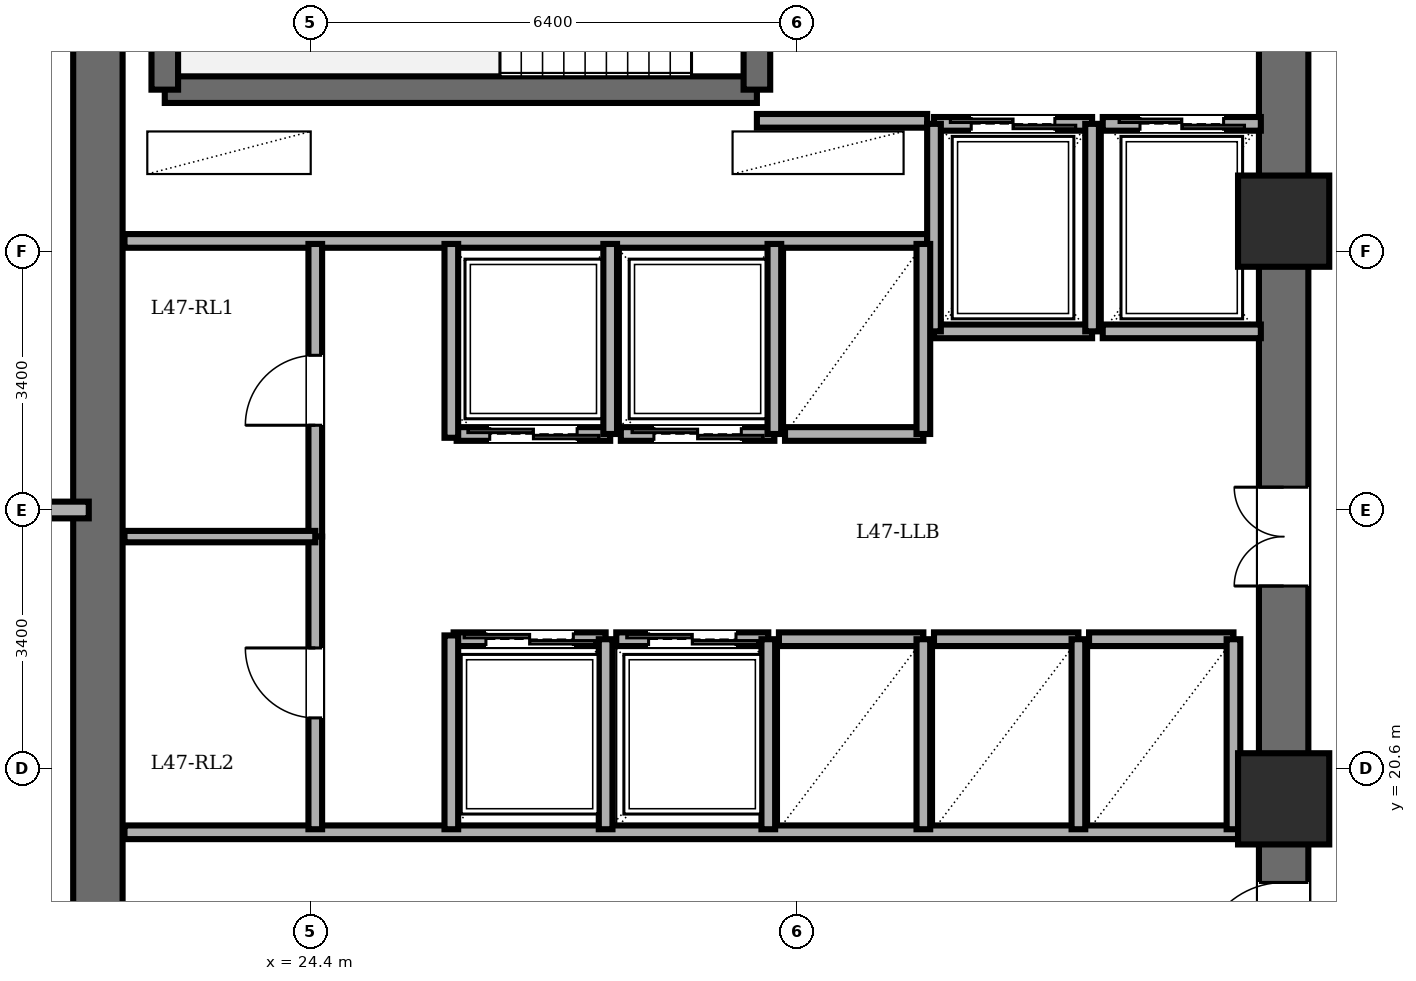
"""IFC4 building model, lengths in metres.
Left out: names, types, materials, properties, quantities, classifications, styles, units other than length and angle.
Written with IfcOpenShell. Run it as: python <this file> out.ifc"""

import sys

from ifc_helpers import new_model, si_unit, direction, frame, frame_2d, origin, origin_2d, place, context, subcontext, project, spatial, rectangle, extrude, element, fill, save


model = new_model("IFC4")
c1 = context("Model", 3, precision=1e-05, world=origin(), true_north=direction((0.0, 1.0)))
c2 = subcontext(c1, "Body", "Model", "MODEL_VIEW")
j1 = project(units=[si_unit("LENGTHUNIT", "METRE"), si_unit("PLANEANGLEUNIT", "RADIAN")], contexts=[c1])
p1 = place(None, origin())
s1 = spatial("IfcSite", under=j1, at=p1, CompositionType="ELEMENT")
p2 = place(p1, origin())
s2 = spatial("IfcBuilding", under=s1, at=p2, CompositionType="ELEMENT")
p3 = place(p2, frame((0.0, 0.0, 179.8)))
s3 = spatial("IfcBuildingStorey", under=s2, at=p3, CompositionType="ELEMENT", Elevation=179.8)
for number, where, z_axis, x_axis in (
    (1, (37.2, 20.2, 0.0), (0.0, 0.0, 1.0), (1.0, 0.0, 0.0)),
    (2, (37.2, 27.8, 0.0), (0.0, 0.0, 1.0), (1.0, 0.0, 0.0)),
):
    element("IfcColumn", number, at=place(p3, frame(where, z_axis=z_axis, x_axis=x_axis)), inside=s3, PredefinedType="COLUMN", context=c2, shape_type="SweptSolid", body=[
        extrude(rectangle(XDim=1.2, YDim=1.2, at=origin_2d()), origin(), (0.0, 0.0, 1.0), 3.6),
    ])
p4 = place(p3, frame((21.6, 14.4, 0.0), z_axis=(0.0, 0.0, 1.0), x_axis=(0.0, 1.0, 0.0)))
e3 = element("IfcWall", 3, at=p4, inside=s3, PredefinedType="SHEAR", context=c2, shape_type="SweptSolid", body=[
    extrude(rectangle(XDim=19.2, YDim=0.65, at=frame_2d((9.6, 0.0))), origin(), (0.0, 0.0, 1.0), 3.4),
])
p5 = place(p3, frame((37.2, 14.4, 0.0), z_axis=(0.0, 0.0, 1.0), x_axis=(0.0, 1.0, 0.0)))
e4 = element("IfcWall", 4, at=p5, inside=s3, PredefinedType="SHEAR", context=c2, shape_type="SweptSolid", body=[
    extrude(rectangle(XDim=19.2, YDim=0.65, at=frame_2d((9.6, 0.0))), origin(), (0.0, 0.0, 1.0), 3.4),
])
p6 = place(p5, frame((15.8, 0.0, 0.0)))
e5 = element("IfcOpeningElement", 5, at=p6, cuts=e4, PredefinedType="OPENING", context=c2, shape_type="SweptSolid", body=[
    extrude(rectangle(XDim=1.15, YDim=2.15, at=frame_2d((0.575, 1.075))), frame((0.0, 0.335, 0.0), z_axis=(0.0, -1.0, 0.0), x_axis=(1.0, 0.0, 0.0)), (0.0, 0.0, 1.0), 0.67),
])
p7 = place(p5, frame((3.6, 0.0, 0.0)))
e6 = element("IfcOpeningElement", 6, at=p7, cuts=e4, PredefinedType="OPENING", context=c2, shape_type="SweptSolid", body=[
    extrude(rectangle(XDim=1.1, YDim=2.15, at=frame_2d((0.55, 1.075))), frame((0.0, 0.335, 0.0), z_axis=(0.0, -1.0, 0.0), x_axis=(1.0, 0.0, 0.0)), (0.0, 0.0, 1.0), 0.67),
])
p8 = place(p5, frame((8.6, 0.0, 0.0)))
e7 = element("IfcOpeningElement", 7, at=p8, cuts=e4, PredefinedType="OPENING", context=c2, shape_type="SweptSolid", body=[
    extrude(rectangle(XDim=1.3, YDim=2.2, at=frame_2d((0.65, 1.1))), frame((0.0, 0.335, 0.0), z_axis=(0.0, -1.0, 0.0), x_axis=(1.0, 0.0, 0.0)), (0.0, 0.0, 1.0), 0.67),
])
p9 = place(p3, frame((22.48, 29.53, 0.0), z_axis=(0.0, 0.0, 1.0), x_axis=(1.0, 0.0, 0.0)))
e8 = element("IfcWall", 8, at=p9, inside=s3, PredefinedType="SOLIDWALL", context=c2, shape_type="SweptSolid", body=[
    extrude(rectangle(XDim=7.79, YDim=0.35, at=frame_2d((3.895, 0.0))), origin(), (0.0, 0.0, 1.0), 3.4),
])
p10 = place(p3, frame((22.48, 29.53, 0.0), z_axis=(0.0, 0.0, 1.0), x_axis=(0.0, 1.0, 0.0)))
e9 = element("IfcWall", 9, at=p10, inside=s3, PredefinedType="SOLIDWALL", context=c2, shape_type="SweptSolid", body=[
    extrude(rectangle(XDim=3.58, YDim=0.35, at=frame_2d((1.79, 0.0))), origin(), (0.0, 0.0, 1.0), 3.4),
])
p11 = place(p3, frame((30.27, 29.53, 0.0), z_axis=(0.0, 0.0, 1.0), x_axis=(0.0, 1.0, 0.0)))
e10 = element("IfcWall", 10, at=p11, inside=s3, PredefinedType="SOLIDWALL", context=c2, shape_type="SweptSolid", body=[
    extrude(rectangle(XDim=3.58, YDim=0.35, at=frame_2d((1.79, 0.0))), origin(), (0.0, 0.0, 1.0), 3.4),
])
p12 = place(p11, frame((1.25, 0.0, 0.0)))
e11 = element("IfcOpeningElement", 11, at=p12, cuts=e10, PredefinedType="OPENING", context=c2, shape_type="SweptSolid", body=[
    extrude(rectangle(XDim=1.1, YDim=2.15, at=frame_2d((0.55, 1.075))), frame((0.0, 0.185, 0.0), z_axis=(0.0, -1.0, 0.0), x_axis=(1.0, 0.0, 0.0)), (0.0, 0.0, 1.0), 0.37),
])
p13 = place(p3, frame((30.27, 29.12, 0.0), z_axis=(0.0, 0.0, 1.0), x_axis=(1.0, 0.0, 0.0)))
e12 = element("IfcWall", 12, at=p13, inside=s3, PredefinedType="PARTITIONING", context=c2, shape_type="SweptSolid", body=[
    extrude(rectangle(XDim=2.24, YDim=0.18, at=frame_2d((1.12, 0.0))), origin(), (0.0, 0.0, 1.0), 3.4),
])
p14 = place(p3, frame((21.95, 27.54, 0.0), z_axis=(0.0, 0.0, 1.0), x_axis=(1.0, 0.0, 0.0)))
e13 = element("IfcWall", 13, at=p14, inside=s3, PredefinedType="PARTITIONING", context=c2, shape_type="SweptSolid", body=[
    extrude(rectangle(XDim=10.56, YDim=0.18, at=frame_2d((5.28, 0.0))), origin(), (0.0, 0.0, 1.0), 3.4),
])
p15 = place(p3, frame((21.95, 19.76, 0.0), z_axis=(0.0, 0.0, 1.0), x_axis=(1.0, 0.0, 0.0)))
e14 = element("IfcWall", 14, at=p15, inside=s3, PredefinedType="PARTITIONING", context=c2, shape_type="SweptSolid", body=[
    extrude(rectangle(XDim=14.87, YDim=0.18, at=frame_2d((7.435, 0.0))), origin(), (0.0, 0.0, 1.0), 3.4),
])
p16 = place(p3, frame((32.6, 29.08, 0.0), z_axis=(0.0, 0.0, 1.0), x_axis=(1.0, 0.0, 0.0)))
e15 = element("IfcWall", 15, at=p16, inside=s3, PredefinedType="PARTITIONING", context=c2, shape_type="SweptSolid", body=[
    extrude(rectangle(XDim=2.08, YDim=0.18, at=frame_2d((1.04, 0.0))), origin(), (0.0, 0.0, 1.0), 3.4),
])
p17 = place(p16, frame((0.49, 0.0, 0.0)))
e16 = element("IfcOpeningElement", 16, at=p17, cuts=e15, PredefinedType="OPENING", context=c2, shape_type="SweptSolid", body=[
    extrude(rectangle(XDim=1.1, YDim=2.2, at=frame_2d((0.55, 1.1))), frame((0.0, 0.1, 0.0), z_axis=(0.0, -1.0, 0.0), x_axis=(1.0, 0.0, 0.0)), (0.0, 0.0, 1.0), 0.2),
])
p18 = place(p3, frame((34.68, 26.35, 0.0), z_axis=(0.0, 0.0, 1.0), x_axis=(-1.0, 0.0, 0.0)))
e17 = element("IfcWall", 17, at=p18, inside=s3, PredefinedType="PARTITIONING", context=c2, shape_type="SweptSolid", body=[
    extrude(rectangle(XDim=2.08, YDim=0.18, at=frame_2d((1.04, 0.0))), origin(), (0.0, 0.0, 1.0), 3.4),
])
for number, where, z_axis, x_axis in (
    (18, (34.68, 26.35, 0.0), (0.0, 0.0, 1.0), (0.0, 1.0, 0.0)),
    (19, (32.6, 29.08, 0.0), (0.0, 0.0, 1.0), (0.0, -1.0, 0.0)),
):
    element("IfcWall", number, at=place(p3, frame(where, z_axis=z_axis, x_axis=x_axis)), inside=s3, PredefinedType="PARTITIONING", context=c2, shape_type="SweptSolid", body=[
        extrude(rectangle(XDim=2.73, YDim=0.18, at=frame_2d((1.365, 0.0))), origin(), (0.0, 0.0, 1.0), 3.4),
    ])
p19 = place(p3, frame((34.82, 29.08, 0.0), z_axis=(0.0, 0.0, 1.0), x_axis=(1.0, 0.0, 0.0)))
e20 = element("IfcWall", 20, at=p19, inside=s3, PredefinedType="PARTITIONING", context=c2, shape_type="SweptSolid", body=[
    extrude(rectangle(XDim=2.08, YDim=0.18, at=frame_2d((1.04, 0.0))), origin(), (0.0, 0.0, 1.0), 3.4),
])
p20 = place(p19, frame((0.49, 0.0, 0.0)))
e21 = element("IfcOpeningElement", 21, at=p20, cuts=e20, PredefinedType="OPENING", context=c2, shape_type="SweptSolid", body=[
    extrude(rectangle(XDim=1.1, YDim=2.2, at=frame_2d((0.55, 1.1))), frame((0.0, 0.1, 0.0), z_axis=(0.0, -1.0, 0.0), x_axis=(1.0, 0.0, 0.0)), (0.0, 0.0, 1.0), 0.2),
])
p21 = place(p3, frame((36.9, 26.35, 0.0), z_axis=(0.0, 0.0, 1.0), x_axis=(-1.0, 0.0, 0.0)))
e22 = element("IfcWall", 22, at=p21, inside=s3, PredefinedType="PARTITIONING", context=c2, shape_type="SweptSolid", body=[
    extrude(rectangle(XDim=2.08, YDim=0.18, at=frame_2d((1.04, 0.0))), origin(), (0.0, 0.0, 1.0), 3.4),
])
p22 = place(p3, frame((28.34, 25.0, 0.0), z_axis=(0.0, 0.0, 1.0), x_axis=(-1.0, 0.0, 0.0)))
e23 = element("IfcWall", 23, at=p22, inside=s3, PredefinedType="PARTITIONING", context=c2, shape_type="SweptSolid", body=[
    extrude(rectangle(XDim=2.02, YDim=0.18, at=frame_2d((1.01, 0.0))), origin(), (0.0, 0.0, 1.0), 3.4),
])
p23 = place(p22, frame((0.435, 0.0, 0.0)))
e24 = element("IfcOpeningElement", 24, at=p23, cuts=e23, PredefinedType="OPENING", context=c2, shape_type="SweptSolid", body=[
    extrude(rectangle(XDim=1.15, YDim=2.2, at=frame_2d((0.575, 1.1))), frame((0.0, 0.1, 0.0), z_axis=(0.0, -1.0, 0.0), x_axis=(1.0, 0.0, 0.0)), (0.0, 0.0, 1.0), 0.2),
])
p24 = place(p3, frame((28.34, 25.0, 0.0), z_axis=(0.0, 0.0, 1.0), x_axis=(0.0, 1.0, 0.0)))
e25 = element("IfcWall", 25, at=p24, inside=s3, PredefinedType="PARTITIONING", context=c2, shape_type="SweptSolid", body=[
    extrude(rectangle(XDim=2.5, YDim=0.18, at=frame_2d((1.25, 0.0))), origin(), (0.0, 0.0, 1.0), 3.4),
])
p25 = place(p3, frame((30.5, 25.0, 0.0), z_axis=(0.0, 0.0, 1.0), x_axis=(-1.0, 0.0, 0.0)))
e26 = element("IfcWall", 26, at=p25, inside=s3, PredefinedType="PARTITIONING", context=c2, shape_type="SweptSolid", body=[
    extrude(rectangle(XDim=2.02, YDim=0.18, at=frame_2d((1.01, 0.0))), origin(), (0.0, 0.0, 1.0), 3.4),
])
p26 = place(p25, frame((0.435, 0.0, 0.0)))
e27 = element("IfcOpeningElement", 27, at=p26, cuts=e26, PredefinedType="OPENING", context=c2, shape_type="SweptSolid", body=[
    extrude(rectangle(XDim=1.15, YDim=2.2, at=frame_2d((0.575, 1.1))), frame((0.0, 0.1, 0.0), z_axis=(0.0, -1.0, 0.0), x_axis=(1.0, 0.0, 0.0)), (0.0, 0.0, 1.0), 0.2),
])
p27 = place(p3, frame((30.5, 25.0, 0.0), z_axis=(0.0, 0.0, 1.0), x_axis=(0.0, 1.0, 0.0)))
e28 = element("IfcWall", 28, at=p27, inside=s3, PredefinedType="PARTITIONING", context=c2, shape_type="SweptSolid", body=[
    extrude(rectangle(XDim=2.5, YDim=0.18, at=frame_2d((1.25, 0.0))), origin(), (0.0, 0.0, 1.0), 3.4),
])
p28 = place(p3, frame((26.28, 22.3, 0.0), z_axis=(0.0, 0.0, 1.0), x_axis=(1.0, 0.0, 0.0)))
e29 = element("IfcWall", 29, at=p28, inside=s3, PredefinedType="PARTITIONING", context=c2, shape_type="SweptSolid", body=[
    extrude(rectangle(XDim=2.0, YDim=0.18, at=frame_2d((1.0, 0.0))), origin(), (0.0, 0.0, 1.0), 3.4),
])
p29 = place(p28, frame((0.425, 0.0, 0.0)))
e30 = element("IfcOpeningElement", 30, at=p29, cuts=e29, PredefinedType="OPENING", context=c2, shape_type="SweptSolid", body=[
    extrude(rectangle(XDim=1.15, YDim=2.2, at=frame_2d((0.575, 1.1))), frame((0.0, 0.1, 0.0), z_axis=(0.0, -1.0, 0.0), x_axis=(1.0, 0.0, 0.0)), (0.0, 0.0, 1.0), 0.2),
])
p30 = place(p3, frame((28.28, 19.8, 0.0), z_axis=(0.0, 0.0, 1.0), x_axis=(0.0, 1.0, 0.0)))
e31 = element("IfcWall", 31, at=p30, inside=s3, PredefinedType="PARTITIONING", context=c2, shape_type="SweptSolid", body=[
    extrude(rectangle(XDim=2.5, YDim=0.18, at=frame_2d((1.25, 0.0))), origin(), (0.0, 0.0, 1.0), 3.4),
])
p31 = place(p3, frame((28.42, 22.3, 0.0), z_axis=(0.0, 0.0, 1.0), x_axis=(1.0, 0.0, 0.0)))
e32 = element("IfcWall", 32, at=p31, inside=s3, PredefinedType="PARTITIONING", context=c2, shape_type="SweptSolid", body=[
    extrude(rectangle(XDim=2.0, YDim=0.18, at=frame_2d((1.0, 0.0))), origin(), (0.0, 0.0, 1.0), 3.4),
])
p32 = place(p31, frame((0.425, 0.0, 0.0)))
e33 = element("IfcOpeningElement", 33, at=p32, cuts=e32, PredefinedType="OPENING", context=c2, shape_type="SweptSolid", body=[
    extrude(rectangle(XDim=1.15, YDim=2.2, at=frame_2d((0.575, 1.1))), frame((0.0, 0.1, 0.0), z_axis=(0.0, -1.0, 0.0), x_axis=(1.0, 0.0, 0.0)), (0.0, 0.0, 1.0), 0.2),
])
p33 = place(p3, frame((30.42, 19.8, 0.0), z_axis=(0.0, 0.0, 1.0), x_axis=(0.0, 1.0, 0.0)))
e34 = element("IfcWall", 34, at=p33, inside=s3, PredefinedType="PARTITIONING", context=c2, shape_type="SweptSolid", body=[
    extrude(rectangle(XDim=2.5, YDim=0.18, at=frame_2d((1.25, 0.0))), origin(), (0.0, 0.0, 1.0), 3.4),
])
p34 = place(p3, frame((32.46, 25.0, 0.0), z_axis=(0.0, 0.0, 1.0), x_axis=(-1.0, 0.0, 0.0)))
e35 = element("IfcWall", 35, at=p34, inside=s3, PredefinedType="PARTITIONING", context=c2, shape_type="SweptSolid", body=[
    extrude(rectangle(XDim=1.82, YDim=0.18, at=frame_2d((0.91, 0.0))), origin(), (0.0, 0.0, 1.0), 3.4),
])
p35 = place(p3, frame((32.46, 25.0, 0.0), z_axis=(0.0, 0.0, 1.0), x_axis=(0.0, 1.0, 0.0)))
e36 = element("IfcWall", 36, at=p35, inside=s3, PredefinedType="PARTITIONING", context=c2, shape_type="SweptSolid", body=[
    extrude(rectangle(XDim=2.5, YDim=0.18, at=frame_2d((1.25, 0.0))), origin(), (0.0, 0.0, 1.0), 3.4),
])
p36 = place(p3, frame((30.56, 22.3, 0.0), z_axis=(0.0, 0.0, 1.0), x_axis=(1.0, 0.0, 0.0)))
e37 = element("IfcWall", 37, at=p36, inside=s3, PredefinedType="PARTITIONING", context=c2, shape_type="SweptSolid", body=[
    extrude(rectangle(XDim=1.9, YDim=0.18, at=frame_2d((0.95, 0.0))), origin(), (0.0, 0.0, 1.0), 3.4),
])
p37 = place(p3, frame((32.46, 19.8, 0.0), z_axis=(0.0, 0.0, 1.0), x_axis=(0.0, 1.0, 0.0)))
e38 = element("IfcWall", 38, at=p37, inside=s3, PredefinedType="PARTITIONING", context=c2, shape_type="SweptSolid", body=[
    extrude(rectangle(XDim=2.5, YDim=0.18, at=frame_2d((1.25, 0.0))), origin(), (0.0, 0.0, 1.0), 3.4),
])
p38 = place(p3, frame((32.6, 22.3, 0.0), z_axis=(0.0, 0.0, 1.0), x_axis=(1.0, 0.0, 0.0)))
e39 = element("IfcWall", 39, at=p38, inside=s3, PredefinedType="PARTITIONING", context=c2, shape_type="SweptSolid", body=[
    extrude(rectangle(XDim=1.9, YDim=0.18, at=frame_2d((0.95, 0.0))), origin(), (0.0, 0.0, 1.0), 3.4),
])
p39 = place(p3, frame((34.5, 19.8, 0.0), z_axis=(0.0, 0.0, 1.0), x_axis=(0.0, 1.0, 0.0)))
e40 = element("IfcWall", 40, at=p39, inside=s3, PredefinedType="PARTITIONING", context=c2, shape_type="SweptSolid", body=[
    extrude(rectangle(XDim=2.5, YDim=0.18, at=frame_2d((1.25, 0.0))), origin(), (0.0, 0.0, 1.0), 3.4),
])
p40 = place(p3, frame((34.64, 22.3, 0.0), z_axis=(0.0, 0.0, 1.0), x_axis=(1.0, 0.0, 0.0)))
e41 = element("IfcWall", 41, at=p40, inside=s3, PredefinedType="PARTITIONING", context=c2, shape_type="SweptSolid", body=[
    extrude(rectangle(XDim=1.9, YDim=0.18, at=frame_2d((0.95, 0.0))), origin(), (0.0, 0.0, 1.0), 3.4),
])
p41 = place(p3, frame((36.54, 19.8, 0.0), z_axis=(0.0, 0.0, 1.0), x_axis=(0.0, 1.0, 0.0)))
e42 = element("IfcWall", 42, at=p41, inside=s3, PredefinedType="PARTITIONING", context=c2, shape_type="SweptSolid", body=[
    extrude(rectangle(XDim=2.5, YDim=0.18, at=frame_2d((1.25, 0.0))), origin(), (0.0, 0.0, 1.0), 3.4),
])
p42 = place(p3, frame((24.46, 23.65, 0.0), z_axis=(0.0, 0.0, 1.0), x_axis=(0.0, 1.0, 0.0)))
e43 = element("IfcWall", 43, at=p42, inside=s3, PredefinedType="PARTITIONING", context=c2, shape_type="SweptSolid", body=[
    extrude(rectangle(XDim=3.85, YDim=0.18, at=frame_2d((1.925, 0.0))), origin(), (0.0, 0.0, 1.0), 3.4),
])
p43 = place(p42, frame((1.465, 0.0, 0.0)))
e44 = element("IfcOpeningElement", 44, at=p43, cuts=e43, PredefinedType="OPENING", context=c2, shape_type="SweptSolid", body=[
    extrude(rectangle(XDim=0.92, YDim=2.1, at=frame_2d((0.46, 1.05))), frame((0.0, 0.1, 0.0), z_axis=(0.0, -1.0, 0.0), x_axis=(1.0, 0.0, 0.0)), (0.0, 0.0, 1.0), 0.2),
])
p44 = place(p3, frame((24.46, 19.8, 0.0), z_axis=(0.0, 0.0, 1.0), x_axis=(0.0, 1.0, 0.0)))
e45 = element("IfcWall", 45, at=p44, inside=s3, PredefinedType="PARTITIONING", context=c2, shape_type="SweptSolid", body=[
    extrude(rectangle(XDim=3.85, YDim=0.18, at=frame_2d((1.925, 0.0))), origin(), (0.0, 0.0, 1.0), 3.4),
])
p45 = place(p44, frame((1.465, 0.0, 0.0)))
e46 = element("IfcOpeningElement", 46, at=p45, cuts=e45, PredefinedType="OPENING", context=c2, shape_type="SweptSolid", body=[
    extrude(rectangle(XDim=0.92, YDim=2.1, at=frame_2d((0.46, 1.05))), frame((0.0, 0.1, 0.0), z_axis=(0.0, -1.0, 0.0), x_axis=(1.0, 0.0, 0.0)), (0.0, 0.0, 1.0), 0.2),
])
p46 = place(p3, frame((21.95, 23.65, 0.0), z_axis=(0.0, 0.0, 1.0), x_axis=(1.0, 0.0, 0.0)))
e47 = element("IfcWall", 47, at=p46, inside=s3, PredefinedType="PARTITIONING", context=c2, shape_type="SweptSolid", body=[
    extrude(rectangle(XDim=2.51, YDim=0.15, at=frame_2d((1.255, 0.0))), origin(), (0.0, 0.0, 1.0), 3.4),
])
for number, where, z_axis, x_axis in (
    (48, (26.25, 24.95, 0.0), (0.0, 0.0, 1.0), (0.0, 1.0, 0.0)),
    (49, (26.25, 19.8, 0.0), (0.0, 0.0, 1.0), (0.0, 1.0, 0.0)),
):
    element("IfcWall", number, at=place(p3, frame(where, z_axis=z_axis, x_axis=x_axis)), inside=s3, PredefinedType="PARTITIONING", context=c2, shape_type="SweptSolid", body=[
        extrude(rectangle(XDim=2.55, YDim=0.18, at=frame_2d((1.275, 0.0))), origin(), (0.0, 0.0, 1.0), 3.4),
    ])
p47 = place(p3, frame((13.8, 24.0, 0.0), z_axis=(0.0, 0.0, 1.0), x_axis=(1.0, 0.0, 0.0)))
e50 = element("IfcWall", 50, at=p47, inside=s3, PredefinedType="PARTITIONING", context=c2, shape_type="SweptSolid", body=[
    extrude(rectangle(XDim=7.68, YDim=0.22, at=frame_2d((3.84, 0.0))), origin(), (0.0, 0.0, 1.0), 3.4),
])
p48 = place(p7, origin())
e51 = element("IfcDoor", 51, at=p48, inside=s3, OperationType="SINGLE_SWING_LEFT", PredefinedType="DOOR", context=c2, shape_type="SweptSolid", body=[
    extrude(rectangle(XDim=1.1, YDim=2.15, at=frame_2d((0.55, 1.075))), frame((0.0, 0.025, 0.0), z_axis=(0.0, -1.0, 0.0), x_axis=(1.0, 0.0, 0.0)), (0.0, 0.0, 1.0), 0.05),
])
fill(e6, e51)
p49 = place(p17, origin())
e52 = element("IfcDoor", 52, at=p49, inside=s3, OperationType="DOUBLE_DOOR_SLIDING", PredefinedType="DOOR", context=c2, shape_type="SweptSolid", body=[
    extrude(rectangle(XDim=1.1, YDim=2.2, at=frame_2d((0.55, 1.1))), frame((0.0, 0.025, 0.0), z_axis=(0.0, -1.0, 0.0), x_axis=(1.0, 0.0, 0.0)), (0.0, 0.0, 1.0), 0.05),
])
fill(e16, e52)
p50 = place(p20, origin())
e53 = element("IfcDoor", 53, at=p50, inside=s3, OperationType="DOUBLE_DOOR_SLIDING", PredefinedType="DOOR", context=c2, shape_type="SweptSolid", body=[
    extrude(rectangle(XDim=1.1, YDim=2.2, at=frame_2d((0.55, 1.1))), frame((0.0, 0.025, 0.0), z_axis=(0.0, -1.0, 0.0), x_axis=(1.0, 0.0, 0.0)), (0.0, 0.0, 1.0), 0.05),
])
fill(e21, e53)
p51 = place(p23, origin())
e54 = element("IfcDoor", 54, at=p51, inside=s3, OperationType="DOUBLE_DOOR_SLIDING", PredefinedType="DOOR", context=c2, shape_type="SweptSolid", body=[
    extrude(rectangle(XDim=1.15, YDim=2.2, at=frame_2d((0.575, 1.1))), frame((0.0, 0.025, 0.0), z_axis=(0.0, -1.0, 0.0), x_axis=(1.0, 0.0, 0.0)), (0.0, 0.0, 1.0), 0.05),
])
fill(e24, e54)
p52 = place(p26, origin())
e55 = element("IfcDoor", 55, at=p52, inside=s3, OperationType="DOUBLE_DOOR_SLIDING", PredefinedType="DOOR", context=c2, shape_type="SweptSolid", body=[
    extrude(rectangle(XDim=1.15, YDim=2.2, at=frame_2d((0.575, 1.1))), frame((0.0, 0.025, 0.0), z_axis=(0.0, -1.0, 0.0), x_axis=(1.0, 0.0, 0.0)), (0.0, 0.0, 1.0), 0.05),
])
fill(e27, e55)
p53 = place(p29, origin())
e56 = element("IfcDoor", 56, at=p53, inside=s3, OperationType="DOUBLE_DOOR_SLIDING", PredefinedType="DOOR", context=c2, shape_type="SweptSolid", body=[
    extrude(rectangle(XDim=1.15, YDim=2.2, at=frame_2d((0.575, 1.1))), frame((0.0, 0.025, 0.0), z_axis=(0.0, -1.0, 0.0), x_axis=(1.0, 0.0, 0.0)), (0.0, 0.0, 1.0), 0.05),
])
fill(e30, e56)
p54 = place(p32, origin())
e57 = element("IfcDoor", 57, at=p54, inside=s3, OperationType="DOUBLE_DOOR_SLIDING", PredefinedType="DOOR", context=c2, shape_type="SweptSolid", body=[
    extrude(rectangle(XDim=1.15, YDim=2.2, at=frame_2d((0.575, 1.1))), frame((0.0, 0.025, 0.0), z_axis=(0.0, -1.0, 0.0), x_axis=(1.0, 0.0, 0.0)), (0.0, 0.0, 1.0), 0.05),
])
fill(e33, e57)
p55 = place(p43, origin())
e58 = element("IfcDoor", 58, at=p55, inside=s3, OperationType="SINGLE_SWING_LEFT", PredefinedType="DOOR", context=c2, shape_type="SweptSolid", body=[
    extrude(rectangle(XDim=0.92, YDim=2.1, at=frame_2d((0.46, 1.05))), frame((0.0, 0.025, 0.0), z_axis=(0.0, -1.0, 0.0), x_axis=(1.0, 0.0, 0.0)), (0.0, 0.0, 1.0), 0.05),
])
fill(e44, e58)
p56 = place(p45, origin())
e59 = element("IfcDoor", 59, at=p56, inside=s3, OperationType="SINGLE_SWING_RIGHT", PredefinedType="DOOR", context=c2, shape_type="SweptSolid", body=[
    extrude(rectangle(XDim=0.92, YDim=2.1, at=frame_2d((0.46, 1.05))), frame((0.0, 0.025, 0.0), z_axis=(0.0, -1.0, 0.0), x_axis=(1.0, 0.0, 0.0)), (0.0, 0.0, 1.0), 0.05),
])
fill(e46, e59)
p57 = place(p8, origin())
e60 = element("IfcDoor", 60, at=p57, inside=s3, OperationType="DOUBLE_DOOR_SINGLE_SWING", PredefinedType="DOOR", context=c2, shape_type="SweptSolid", body=[
    extrude(rectangle(XDim=1.3, YDim=2.2, at=frame_2d((0.65, 1.1))), frame((0.0, 0.025, 0.0), z_axis=(0.0, -1.0, 0.0), x_axis=(1.0, 0.0, 0.0)), (0.0, 0.0, 1.0), 0.05),
])
fill(e7, e60)
save(model, sys.argv[1])
